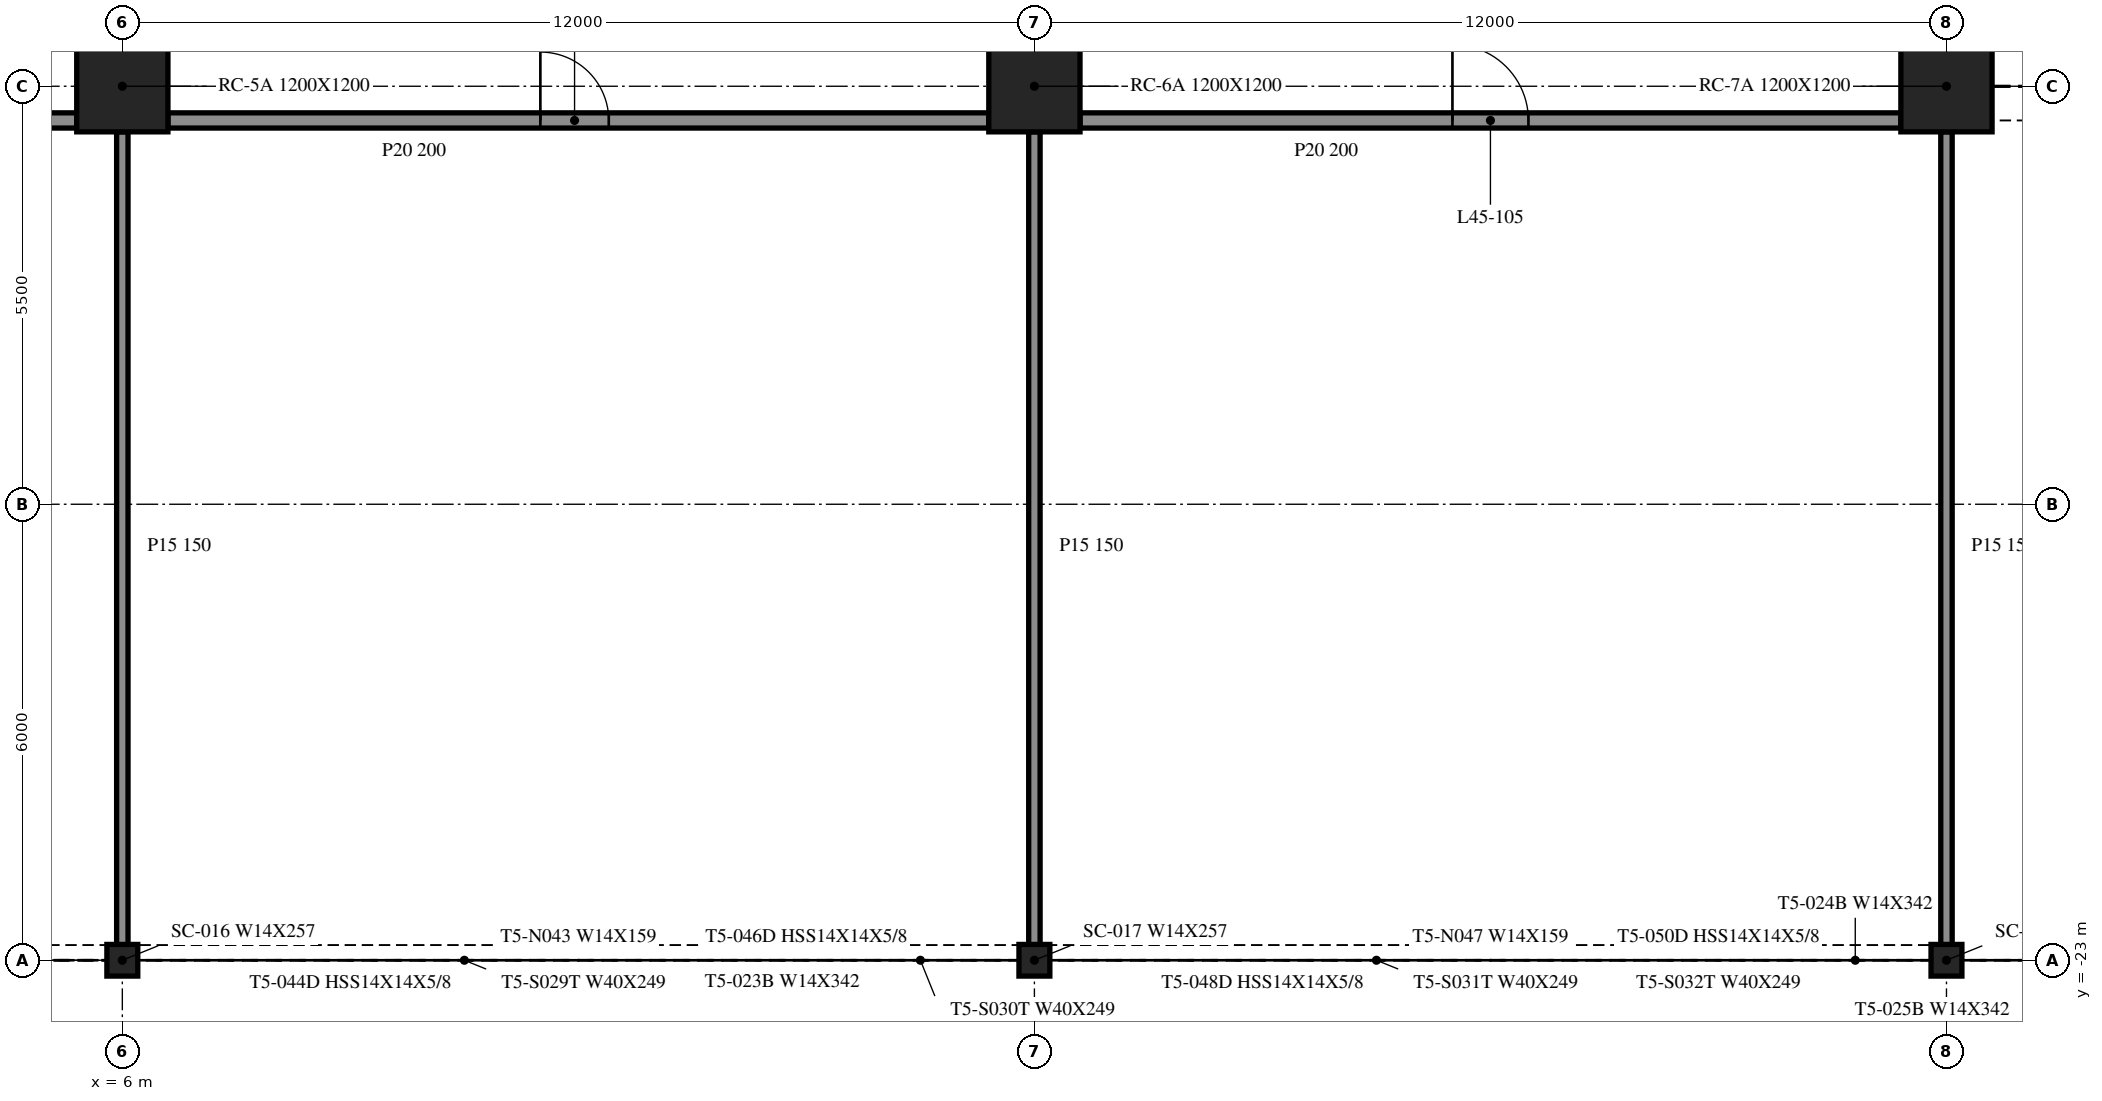
"""IFC4 building model, lengths in metres.
Left out: names, types, materials, properties, quantities, classifications, styles, units other than length and angle.
Written with IfcOpenShell. Run it as: python <this file> out.ifc"""

import sys

from ifc_helpers import new_model, si_unit, direction, frame, frame_2d, origin, origin_2d, place, context, subcontext, project, spatial, rectangle, i_section, extrude, element, fill, save


model = new_model("IFC4")
c1 = context("Model", 3, precision=1e-05, world=origin(), true_north=direction((0.0, 1.0)))
c2 = subcontext(c1, "Body", "Model", "MODEL_VIEW")
j1 = project(units=[si_unit("LENGTHUNIT", "METRE"), si_unit("PLANEANGLEUNIT", "RADIAN")], contexts=[c1])
p1 = place(None, origin())
s1 = spatial("IfcSite", under=j1, at=p1, CompositionType="ELEMENT")
p2 = place(p1, origin())
s2 = spatial("IfcBuilding", under=s1, at=p2, CompositionType="ELEMENT")
p3 = place(p2, frame((0.0, 0.0, 189.6)))
s3 = spatial("IfcBuildingStorey", under=s2, at=p3, CompositionType="ELEMENT", Elevation=189.6)
for number, where, z_axis, x_axis in (
    (1, (6.0, -11.5, -0.4), (0.0, 0.0, 1.0), (1.0, 0.0, 0.0)),
    (2, (18.0, -11.5, -0.4), (0.0, 0.0, 1.0), (1.0, 0.0, 0.0)),
    (3, (30.0, -11.5, -0.4), (0.0, 0.0, 1.0), (1.0, 0.0, 0.0)),
):
    element("IfcColumn", number, at=place(p3, frame(where, z_axis=z_axis, x_axis=x_axis)), inside=s3, PredefinedType="COLUMN", context=c2, shape_type="SweptSolid", body=[
        extrude(rectangle(XDim=1.2, YDim=1.2, at=origin_2d()), origin(), (0.0, 0.0, 1.0), 4.36),
    ])
for number, where, z_axis, x_axis in (
    (4, (6.0, -23.0, -0.4), (0.0, 0.0, 1.0), (1.0, 0.0, 0.0)),
    (5, (18.0, -23.0, -0.4), (0.0, 0.0, 1.0), (1.0, 0.0, 0.0)),
    (6, (30.0, -23.0, -0.4), (0.0, 0.0, 1.0), (1.0, 0.0, 0.0)),
):
    element("IfcColumn", number, at=place(p3, frame(where, z_axis=z_axis, x_axis=x_axis)), inside=s3, PredefinedType="COLUMN", context=c2, shape_type="SweptSolid", body=[
        extrude(i_section(OverallWidth=0.406, OverallDepth=0.417, WebThickness=0.03, FlangeThickness=0.048, at=origin_2d()), origin(), (0.0, 0.0, 1.0), 4.36),
    ])
p4 = place(p3, frame((-5.4, -11.95, 0.0), z_axis=(0.0, 0.0, 1.0), x_axis=(1.0, 0.0, 0.0)))
e7 = element("IfcWall", 7, at=p4, inside=s3, PredefinedType="PARTITIONING", context=c2, shape_type="SweptSolid", body=[
    extrude(rectangle(XDim=10.8, YDim=0.2, at=frame_2d((5.4, 0.0))), origin(), (0.0, 0.0, 1.0), 3.96),
])
p5 = place(p4, frame((4.9, 0.0, 0.0)))
e8 = element("IfcOpeningElement", 8, at=p5, cuts=e7, PredefinedType="OPENING", context=c2, shape_type="SweptSolid", body=[
    extrude(rectangle(XDim=1.0, YDim=2.1, at=frame_2d((0.5, 1.05))), frame((0.0, 0.11, 0.0), z_axis=(0.0, -1.0, 0.0), x_axis=(1.0, 0.0, 0.0)), (0.0, 0.0, 1.0), 0.22),
])
p6 = place(p3, frame((6.6, -11.95, 0.0), z_axis=(0.0, 0.0, 1.0), x_axis=(1.0, 0.0, 0.0)))
e9 = element("IfcWall", 9, at=p6, inside=s3, PredefinedType="PARTITIONING", context=c2, shape_type="SweptSolid", body=[
    extrude(rectangle(XDim=10.8, YDim=0.2, at=frame_2d((5.4, 0.0))), origin(), (0.0, 0.0, 1.0), 3.96),
])
p7 = place(p6, frame((4.9, 0.0, 0.0)))
e10 = element("IfcOpeningElement", 10, at=p7, cuts=e9, PredefinedType="OPENING", context=c2, shape_type="SweptSolid", body=[
    extrude(rectangle(XDim=0.9, YDim=2.1, at=frame_2d((0.45, 1.05))), frame((0.0, 0.11, 0.0), z_axis=(0.0, -1.0, 0.0), x_axis=(1.0, 0.0, 0.0)), (0.0, 0.0, 1.0), 0.22),
])
p8 = place(p3, frame((18.6, -11.95, 0.0), z_axis=(0.0, 0.0, 1.0), x_axis=(1.0, 0.0, 0.0)))
e11 = element("IfcWall", 11, at=p8, inside=s3, PredefinedType="PARTITIONING", context=c2, shape_type="SweptSolid", body=[
    extrude(rectangle(XDim=10.8, YDim=0.2, at=frame_2d((5.4, 0.0))), origin(), (0.0, 0.0, 1.0), 3.96),
])
p9 = place(p8, frame((4.9, 0.0, 0.0)))
e12 = element("IfcOpeningElement", 12, at=p9, cuts=e11, PredefinedType="OPENING", context=c2, shape_type="SweptSolid", body=[
    extrude(rectangle(XDim=1.0, YDim=2.1, at=frame_2d((0.5, 1.05))), frame((0.0, 0.11, 0.0), z_axis=(0.0, -1.0, 0.0), x_axis=(1.0, 0.0, 0.0)), (0.0, 0.0, 1.0), 0.22),
])
for number, where, z_axis, x_axis in (
    (13, (6.0, -23.0, 0.0), (0.0, 0.0, 1.0), (0.0, 1.0, 0.0)),
    (14, (18.0, -23.0, 0.0), (0.0, 0.0, 1.0), (0.0, 1.0, 0.0)),
    (15, (30.0, -23.0, 0.0), (0.0, 0.0, 1.0), (0.0, 1.0, 0.0)),
):
    element("IfcWall", number, at=place(p3, frame(where, z_axis=z_axis, x_axis=x_axis)), inside=s3, PredefinedType="PARTITIONING", context=c2, shape_type="SweptSolid", body=[
        extrude(rectangle(XDim=10.9, YDim=0.15, at=frame_2d((5.45, 0.0))), origin(), (0.0, 0.0, 1.0), 3.96),
    ])
p10 = place(p7, origin())
e16 = element("IfcDoor", 16, at=p10, inside=s3, OperationType="SINGLE_SWING_RIGHT", PredefinedType="DOOR", context=c2, shape_type="SweptSolid", body=[
    extrude(rectangle(XDim=0.9, YDim=2.1, at=frame_2d((0.45, 1.05))), frame((0.0, 0.025, 0.0), z_axis=(0.0, -1.0, 0.0), x_axis=(1.0, 0.0, 0.0)), (0.0, 0.0, 1.0), 0.05),
])
fill(e10, e16)
p11 = place(p9, origin())
e17 = element("IfcDoor", 17, at=p11, inside=s3, OperationType="SINGLE_SWING_LEFT", PredefinedType="DOOR", context=c2, shape_type="SweptSolid", body=[
    extrude(rectangle(XDim=1.0, YDim=2.1, at=frame_2d((0.5, 1.05))), frame((0.0, 0.025, 0.0), z_axis=(0.0, -1.0, 0.0), x_axis=(1.0, 0.0, 0.0)), (0.0, 0.0, 1.0), 0.05),
])
fill(e12, e17)
save(model, sys.argv[1])
